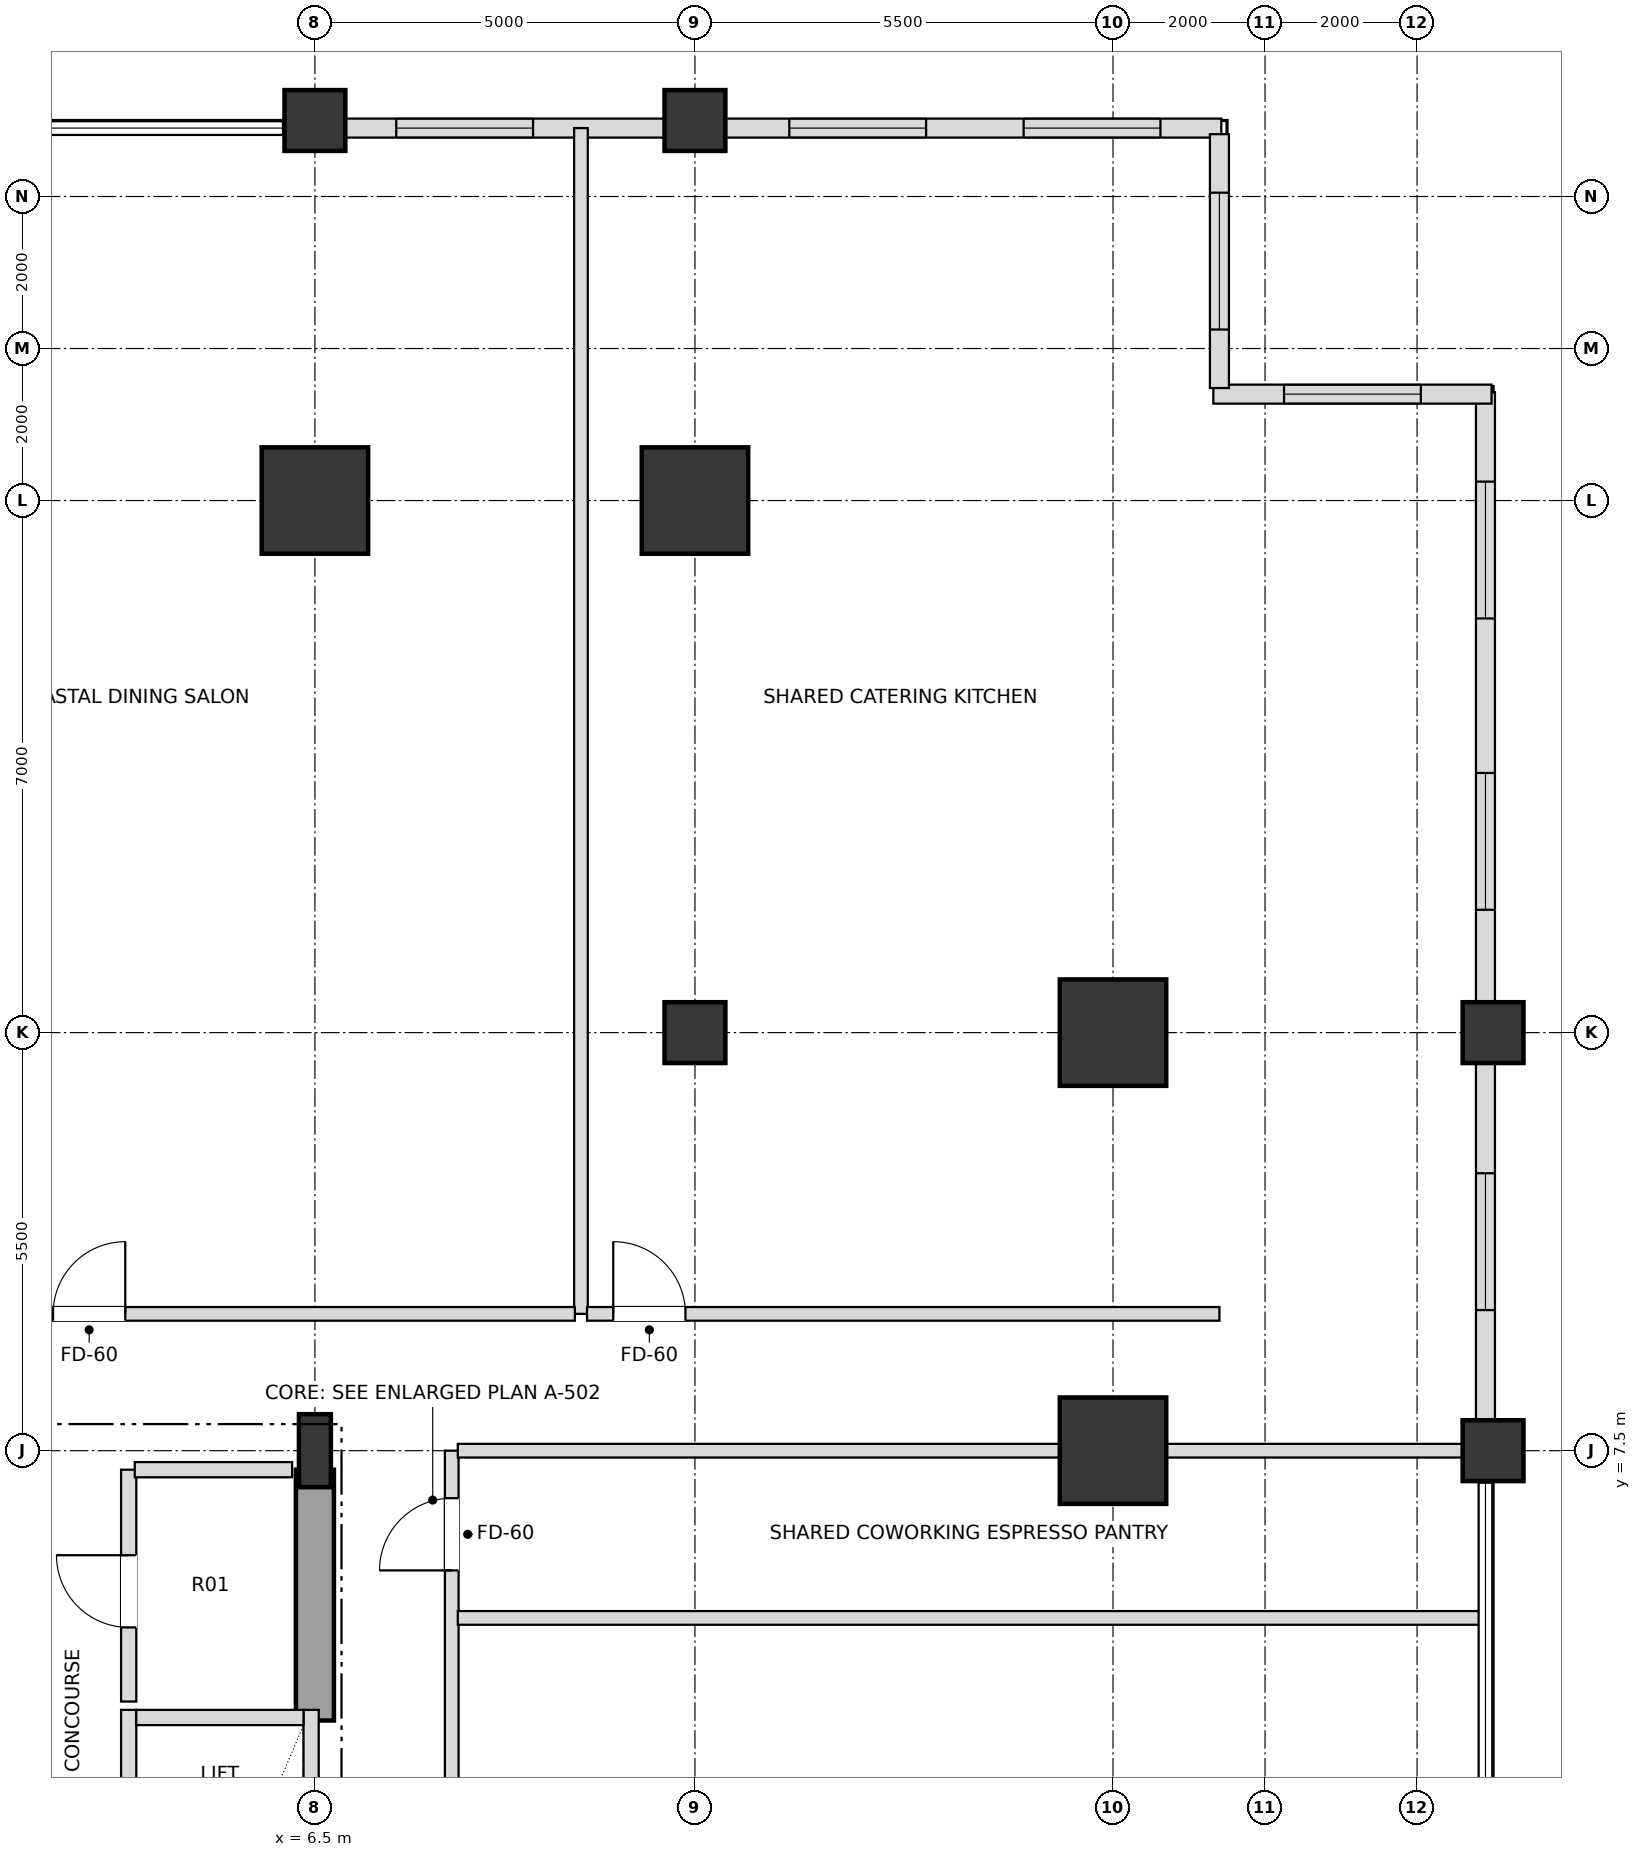
"""IFC4 building model, lengths in metres.
Left out: names, types, materials, properties, quantities, classifications, styles, units other than length and angle.
Written with IfcOpenShell. Run it as: python <this file> out.ifc"""

import sys

from ifc_helpers import new_model, si_unit, direction, frame, frame_2d, origin, origin_2d, place, context, subcontext, project, spatial, rectangle, i_section, extrude, element, fill, save


model = new_model("IFC4")
c1 = context("Model", 3, precision=1e-05, world=origin(), true_north=direction((0.0, 1.0)))
c2 = subcontext(c1, "Body", "Model", "MODEL_VIEW")
j1 = project(units=[si_unit("LENGTHUNIT", "METRE"), si_unit("PLANEANGLEUNIT", "RADIAN")], contexts=[c1])
p1 = place(None, origin())
s1 = spatial("IfcSite", under=j1, at=p1, CompositionType="ELEMENT")
p2 = place(p1, origin())
s2 = spatial("IfcBuilding", under=s1, at=p2, CompositionType="ELEMENT")
p3 = place(p2, frame((0.0, 0.0, 79.2)))
s3 = spatial("IfcBuildingStorey", under=s2, at=p3, CompositionType="ELEMENT", Elevation=79.2)
p4 = place(p3, frame((6.5, 7.5, 0.0), z_axis=(0.0, 0.0, 1.0), x_axis=(1.0, 0.0, 0.0)))
e1 = element("IfcColumn", 1, at=p4, inside=s3, PredefinedType="COLUMN", context=c2, shape_type="SweptSolid", body=[
    extrude(i_section(OverallWidth=0.42, OverallDepth=0.96, WebThickness=0.022, FlangeThickness=0.034, at=origin_2d()), origin(), (0.0, 0.0, 1.0), 3.6),
])
for number, where, z_axis, x_axis in (
    (2, (17.0, 7.5, 0.0), (0.0, 0.0, 1.0), (1.0, 0.0, 0.0)),
    (3, (17.0, 13.0, 0.0), (0.0, 0.0, 1.0), (1.0, 0.0, 0.0)),
    (4, (11.5, 20.0, 0.0), (0.0, 0.0, 1.0), (1.0, 0.0, 0.0)),
    (5, (6.5, 20.0, 0.0), (0.0, 0.0, 1.0), (1.0, 0.0, 0.0)),
):
    element("IfcColumn", number, at=place(p3, frame(where, z_axis=z_axis, x_axis=x_axis)), inside=s3, PredefinedType="USERDEFINED", context=c2, shape_type="SweptSolid", body=[
        extrude(rectangle(XDim=1.4, YDim=1.4, at=origin_2d()), origin(), (0.0, 0.0, 1.0), 3.6),
    ])
for number, where, z_axis, x_axis in (
    (6, (11.5, 13.0, 0.0), (0.0, 0.0, 1.0), (1.0, 0.0, 0.0)),
    (7, (6.5, 25.0, 0.0), (0.0, 0.0, 1.0), (1.0, 0.0, 0.0)),
    (8, (11.5, 25.0, 0.0), (0.0, 0.0, 1.0), (1.0, 0.0, 0.0)),
    (9, (22.0, 7.5, 0.0), (0.0, 0.0, 1.0), (1.0, 0.0, 0.0)),
    (10, (22.0, 13.0, 0.0), (0.0, 0.0, 1.0), (1.0, 0.0, 0.0)),
):
    element("IfcColumn", number, at=place(p3, frame(where, z_axis=z_axis, x_axis=x_axis)), inside=s3, PredefinedType="COLUMN", context=c2, shape_type="SweptSolid", body=[
        extrude(rectangle(XDim=0.8, YDim=0.8, at=origin_2d()), origin(), (0.0, 0.0, 1.0), 3.6),
    ])
p5 = place(p3, frame((18.425, 24.9, 0.0), z_axis=(0.0, 0.0, 1.0), x_axis=(-1.0, 0.0, 0.0)))
e11 = element("IfcWall", 11, at=p5, inside=s3, PredefinedType="SOLIDWALL", context=c2, shape_type="SweptSolid", body=[
    extrude(rectangle(XDim=6.53, YDim=0.25, at=frame_2d((3.265, 0.0))), origin(), (0.0, 0.0, 1.0), 2.736),
])
p6 = place(p5, frame((0.801, 0.0, 0.72)))
e12 = element("IfcOpeningElement", 12, at=p6, cuts=e11, PredefinedType="OPENING", context=c2, shape_type="SweptSolid", body=[
    extrude(rectangle(XDim=1.8, YDim=1.68, at=frame_2d((0.9, 0.84))), frame((0.0, 0.135, 0.0), z_axis=(0.0, -1.0, 0.0), x_axis=(1.0, 0.0, 0.0)), (0.0, 0.0, 1.0), 0.27),
])
p7 = place(p5, frame((3.884, 0.0, 0.72)))
e13 = element("IfcOpeningElement", 13, at=p7, cuts=e11, PredefinedType="OPENING", context=c2, shape_type="SweptSolid", body=[
    extrude(rectangle(XDim=1.8, YDim=1.68, at=frame_2d((0.9, 0.84))), frame((0.0, 0.135, 0.0), z_axis=(0.0, -1.0, 0.0), x_axis=(1.0, 0.0, 0.0)), (0.0, 0.0, 1.0), 0.27),
])
p8 = place(p3, frame((11.105, 24.9, 0.0), z_axis=(0.0, 0.0, 1.0), x_axis=(-1.0, 0.0, 0.0)))
e14 = element("IfcWall", 14, at=p8, inside=s3, PredefinedType="SOLIDWALL", context=c2, shape_type="SweptSolid", body=[
    extrude(rectangle(XDim=4.21, YDim=0.25, at=frame_2d((2.105, 0.0))), origin(), (0.0, 0.0, 1.0), 2.736),
])
p9 = place(p8, frame((1.735, 0.0, 0.72)))
e15 = element("IfcOpeningElement", 15, at=p9, cuts=e14, PredefinedType="OPENING", context=c2, shape_type="SweptSolid", body=[
    extrude(rectangle(XDim=1.8, YDim=1.68, at=frame_2d((0.9, 0.84))), frame((0.0, 0.135, 0.0), z_axis=(0.0, -1.0, 0.0), x_axis=(1.0, 0.0, 0.0)), (0.0, 0.0, 1.0), 0.27),
])
p10 = place(p3, frame((21.9, 7.895, 0.0), z_axis=(0.0, 0.0, 1.0), x_axis=(0.0, 1.0, 0.0)))
e16 = element("IfcWall", 16, at=p10, inside=s3, PredefinedType="SOLIDWALL", context=c2, shape_type="SweptSolid", body=[
    extrude(rectangle(XDim=4.71, YDim=0.25, at=frame_2d((2.355, 0.0))), origin(), (0.0, 0.0, 1.0), 2.736),
])
p11 = place(p10, frame((1.455, 0.0, 0.72)))
e17 = element("IfcOpeningElement", 17, at=p11, cuts=e16, PredefinedType="OPENING", context=c2, shape_type="SweptSolid", body=[
    extrude(rectangle(XDim=1.8, YDim=1.68, at=frame_2d((0.9, 0.84))), frame((0.0, 0.135, 0.0), z_axis=(0.0, -1.0, 0.0), x_axis=(1.0, 0.0, 0.0)), (0.0, 0.0, 1.0), 0.27),
])
p12 = place(p3, frame((21.9, 13.395, 0.0), z_axis=(0.0, 0.0, 1.0), x_axis=(0.0, 1.0, 0.0)))
e18 = element("IfcWall", 18, at=p12, inside=s3, PredefinedType="SOLIDWALL", context=c2, shape_type="SweptSolid", body=[
    extrude(rectangle(XDim=8.03, YDim=0.25, at=frame_2d((4.015, 0.0))), origin(), (0.0, 0.0, 1.0), 2.736),
])
p13 = place(p12, frame((1.221, 0.0, 0.72)))
e19 = element("IfcOpeningElement", 19, at=p13, cuts=e18, PredefinedType="OPENING", context=c2, shape_type="SweptSolid", body=[
    extrude(rectangle(XDim=1.8, YDim=1.68, at=frame_2d((0.9, 0.84))), frame((0.0, 0.135, 0.0), z_axis=(0.0, -1.0, 0.0), x_axis=(1.0, 0.0, 0.0)), (0.0, 0.0, 1.0), 0.27),
])
p14 = place(p12, frame((5.054, 0.0, 0.72)))
e20 = element("IfcOpeningElement", 20, at=p14, cuts=e18, PredefinedType="OPENING", context=c2, shape_type="SweptSolid", body=[
    extrude(rectangle(XDim=1.8, YDim=1.68, at=frame_2d((0.9, 0.84))), frame((0.0, 0.135, 0.0), z_axis=(0.0, -1.0, 0.0), x_axis=(1.0, 0.0, 0.0)), (0.0, 0.0, 1.0), 0.27),
])
p15 = place(p3, frame((21.98, 21.4, 0.0), z_axis=(0.0, 0.0, 1.0), x_axis=(-1.0, 0.0, 0.0)))
e21 = element("IfcWall", 21, at=p15, inside=s3, PredefinedType="SOLIDWALL", context=c2, shape_type="SweptSolid", body=[
    extrude(rectangle(XDim=3.66, YDim=0.25, at=frame_2d((1.83, 0.0))), origin(), (0.0, 0.0, 1.0), 2.736),
])
p16 = place(p15, frame((0.93, 0.0, 0.72)))
e22 = element("IfcOpeningElement", 22, at=p16, cuts=e21, PredefinedType="OPENING", context=c2, shape_type="SweptSolid", body=[
    extrude(rectangle(XDim=1.8, YDim=1.68, at=frame_2d((0.9, 0.84))), frame((0.0, 0.135, 0.0), z_axis=(0.0, -1.0, 0.0), x_axis=(1.0, 0.0, 0.0)), (0.0, 0.0, 1.0), 0.27),
])
p17 = place(p3, frame((18.4, 21.48, 0.0), z_axis=(0.0, 0.0, 1.0), x_axis=(0.0, 1.0, 0.0)))
e23 = element("IfcWall", 23, at=p17, inside=s3, PredefinedType="SOLIDWALL", context=c2, shape_type="SweptSolid", body=[
    extrude(rectangle(XDim=3.34, YDim=0.25, at=frame_2d((1.67, 0.0))), origin(), (0.0, 0.0, 1.0), 2.736),
])
p18 = place(p17, frame((0.77, 0.0, 0.72)))
e24 = element("IfcOpeningElement", 24, at=p18, cuts=e23, PredefinedType="OPENING", context=c2, shape_type="SweptSolid", body=[
    extrude(rectangle(XDim=1.8, YDim=1.68, at=frame_2d((0.9, 0.84))), frame((0.0, 0.135, 0.0), z_axis=(0.0, -1.0, 0.0), x_axis=(1.0, 0.0, 0.0)), (0.0, 0.0, 1.0), 0.27),
])
p19 = place(p3, frame((6.5, 3.95, 0.0), z_axis=(0.0, 0.0, 1.0), x_axis=(0.0, 1.0, 0.0)))
e25 = element("IfcWall", 25, at=p19, inside=s3, PredefinedType="SHEAR", context=c2, shape_type="SweptSolid", body=[
    extrude(rectangle(XDim=3.3, YDim=0.5, at=frame_2d((1.65, 0.0))), origin(), (0.0, 0.0, 1.0), 3.38),
])
p20 = place(p3, frame((4.05, -1.49, 0.0), z_axis=(0.0, 0.0, 1.0), x_axis=(0.0, 1.0, 0.0)))
e26 = element("IfcWall", 26, at=p20, inside=s3, PredefinedType="SOLIDWALL", context=c2, shape_type="SweptSolid", body=[
    extrude(rectangle(XDim=5.58, YDim=0.2, at=frame_2d((2.79, 0.0))), origin(), (0.0, 0.0, 1.0), 3.38),
])
p21 = place(p3, frame((6.45, -1.49, 0.0), z_axis=(0.0, 0.0, 1.0), x_axis=(0.0, 1.0, 0.0)))
e27 = element("IfcWall", 27, at=p21, inside=s3, PredefinedType="SOLIDWALL", context=c2, shape_type="SweptSolid", body=[
    extrude(rectangle(XDim=5.58, YDim=0.2, at=frame_2d((2.79, 0.0))), origin(), (0.0, 0.0, 1.0), 2.816),
])
p22 = place(p3, frame((4.15, 3.99, 0.0), z_axis=(0.0, 0.0, 1.0), x_axis=(1.0, 0.0, 0.0)))
e28 = element("IfcWall", 28, at=p22, inside=s3, PredefinedType="SOLIDWALL", context=c2, shape_type="SweptSolid", body=[
    extrude(rectangle(XDim=2.2, YDim=0.2, at=frame_2d((1.1, 0.0))), origin(), (0.0, 0.0, 1.0), 3.38),
])
p23 = place(p3, frame((4.05, 4.2, 0.0), z_axis=(0.0, 0.0, 1.0), x_axis=(0.0, 1.0, 0.0)))
e29 = element("IfcWall", 29, at=p23, inside=s3, PredefinedType="SOLIDWALL", context=c2, shape_type="SweptSolid", body=[
    extrude(rectangle(XDim=3.05, YDim=0.2, at=frame_2d((1.525, 0.0))), origin(), (0.0, 0.0, 1.0), 3.38),
])
p24 = place(p23, frame((0.975, 0.0, 0.0)))
e30 = element("IfcOpeningElement", 30, at=p24, cuts=e29, PredefinedType="OPENING", context=c2, shape_type="SweptSolid", body=[
    extrude(rectangle(XDim=0.95, YDim=2.15, at=frame_2d((0.475, 1.075))), frame((0.0, 0.11, 0.0), z_axis=(0.0, -1.0, 0.0), x_axis=(1.0, 0.0, 0.0)), (0.0, 0.0, 1.0), 0.22),
])
p25 = place(p3, frame((8.3, -7.5, 0.0), z_axis=(0.0, 0.0, 1.0), x_axis=(0.0, 1.0, 0.0)))
e31 = element("IfcWall", 31, at=p25, inside=s3, PredefinedType="PARTITIONING", context=c2, shape_type="SweptSolid", body=[
    extrude(rectangle(XDim=15.0, YDim=0.18, at=frame_2d((7.5, 0.0))), origin(), (0.0, 0.0, 1.0), 3.38),
])
p26 = place(p25, frame((2.075, 0.0, 0.0)))
e32 = element("IfcOpeningElement", 32, at=p26, cuts=e31, PredefinedType="OPENING", context=c2, shape_type="SweptSolid", body=[
    extrude(rectangle(XDim=0.95, YDim=2.15, at=frame_2d((0.475, 1.075))), frame((0.0, 0.1, 0.0), z_axis=(0.0, -1.0, 0.0), x_axis=(1.0, 0.0, 0.0)), (0.0, 0.0, 1.0), 0.2),
])
p27 = place(p25, frame((8.475, 0.0, 0.0)))
e33 = element("IfcOpeningElement", 33, at=p27, cuts=e31, PredefinedType="OPENING", context=c2, shape_type="SweptSolid", body=[
    extrude(rectangle(XDim=0.95, YDim=2.15, at=frame_2d((0.475, 1.075))), frame((0.0, 0.1, 0.0), z_axis=(0.0, -1.0, 0.0), x_axis=(1.0, 0.0, 0.0)), (0.0, 0.0, 1.0), 0.2),
])
p28 = place(p25, frame((13.425, 0.0, 0.0)))
e34 = element("IfcOpeningElement", 34, at=p28, cuts=e31, PredefinedType="OPENING", context=c2, shape_type="SweptSolid", body=[
    extrude(rectangle(XDim=0.95, YDim=2.15, at=frame_2d((0.475, 1.075))), frame((0.0, 0.1, 0.0), z_axis=(0.0, -1.0, 0.0), x_axis=(1.0, 0.0, 0.0)), (0.0, 0.0, 1.0), 0.2),
])
p29 = place(p3, frame((10.0, 9.3, 0.0), z_axis=(0.0, 0.0, 1.0), x_axis=(0.0, 1.0, 0.0)))
e35 = element("IfcWall", 35, at=p29, inside=s3, PredefinedType="PARTITIONING", context=c2, shape_type="SweptSolid", body=[
    extrude(rectangle(XDim=15.6, YDim=0.18, at=frame_2d((7.8, 0.0))), origin(), (0.0, 0.0, 1.0), 2.816),
])
p30 = place(p3, frame((8.38, 5.3, 0.0), z_axis=(0.0, 0.0, 1.0), x_axis=(1.0, 0.0, 0.0)))
e36 = element("IfcWall", 36, at=p30, inside=s3, PredefinedType="PARTITIONING", context=c2, shape_type="SweptSolid", body=[
    extrude(rectangle(XDim=13.44, YDim=0.18, at=frame_2d((6.72, 0.0))), origin(), (0.0, 0.0, 1.0), 2.816),
])
p31 = place(p3, frame((4.13, 7.25, 0.0), z_axis=(0.0, 0.0, 1.0), x_axis=(1.0, 0.0, 0.0)))
e37 = element("IfcWall", 37, at=p31, inside=s3, PredefinedType="SOLIDWALL", context=c2, shape_type="SweptSolid", body=[
    extrude(rectangle(XDim=2.07, YDim=0.2, at=frame_2d((1.035, 0.0))), origin(), (0.0, 0.0, 1.0), 3.38),
])
p32 = place(p3, frame((8.38, 7.5, 0.0), z_axis=(0.0, 0.0, 1.0), x_axis=(1.0, 0.0, 0.0)))
e38 = element("IfcWall", 38, at=p32, inside=s3, PredefinedType="PARTITIONING", context=c2, shape_type="SweptSolid", body=[
    extrude(rectangle(XDim=13.52, YDim=0.18, at=frame_2d((6.76, 0.0))), origin(), (0.0, 0.0, 1.0), 2.816),
])
p33 = place(p3, frame((-2.87, 9.3, 0.0), z_axis=(0.0, 0.0, 1.0), x_axis=(1.0, 0.0, 0.0)))
e39 = element("IfcWall", 39, at=p33, inside=s3, PredefinedType="PARTITIONING", context=c2, shape_type="SweptSolid", body=[
    extrude(rectangle(XDim=12.79, YDim=0.18, at=frame_2d((6.395, 0.0))), origin(), (0.0, 0.0, 1.0), 2.816),
])
p34 = place(p33, frame((5.925, 0.0, 0.0)))
e40 = element("IfcOpeningElement", 40, at=p34, cuts=e39, PredefinedType="OPENING", context=c2, shape_type="SweptSolid", body=[
    extrude(rectangle(XDim=0.95, YDim=2.15, at=frame_2d((0.475, 1.075))), frame((0.0, 0.1, 0.0), z_axis=(0.0, -1.0, 0.0), x_axis=(1.0, 0.0, 0.0)), (0.0, 0.0, 1.0), 0.2),
])
p35 = place(p3, frame((10.08, 9.3, 0.0), z_axis=(0.0, 0.0, 1.0), x_axis=(1.0, 0.0, 0.0)))
e41 = element("IfcWall", 41, at=p35, inside=s3, PredefinedType="PARTITIONING", context=c2, shape_type="SweptSolid", body=[
    extrude(rectangle(XDim=8.32, YDim=0.18, at=frame_2d((4.16, 0.0))), origin(), (0.0, 0.0, 1.0), 2.816),
])
p36 = place(p35, frame((0.345, 0.0, 0.0)))
e42 = element("IfcOpeningElement", 42, at=p36, cuts=e41, PredefinedType="OPENING", context=c2, shape_type="SweptSolid", body=[
    extrude(rectangle(XDim=0.95, YDim=2.15, at=frame_2d((0.475, 1.075))), frame((0.0, 0.1, 0.0), z_axis=(0.0, -1.0, 0.0), x_axis=(1.0, 0.0, 0.0)), (0.0, 0.0, 1.0), 0.2),
])
p37 = place(p6, origin())
e43 = element("IfcWindow", 43, at=p37, inside=s3, PartitioningType="SINGLE_PANEL", PredefinedType="WINDOW", context=c2, shape_type="SweptSolid", body=[
    extrude(rectangle(XDim=1.8, YDim=1.68, at=frame_2d((0.9, 0.84))), frame((0.0, 0.03, 0.0), z_axis=(0.0, -1.0, 0.0), x_axis=(1.0, 0.0, 0.0)), (0.0, 0.0, 1.0), 0.06),
])
fill(e12, e43)
p38 = place(p7, origin())
e44 = element("IfcWindow", 44, at=p38, inside=s3, PartitioningType="SINGLE_PANEL", PredefinedType="WINDOW", context=c2, shape_type="SweptSolid", body=[
    extrude(rectangle(XDim=1.8, YDim=1.68, at=frame_2d((0.9, 0.84))), frame((0.0, 0.03, 0.0), z_axis=(0.0, -1.0, 0.0), x_axis=(1.0, 0.0, 0.0)), (0.0, 0.0, 1.0), 0.06),
])
fill(e13, e44)
p39 = place(p9, origin())
e45 = element("IfcWindow", 45, at=p39, inside=s3, PartitioningType="SINGLE_PANEL", PredefinedType="WINDOW", context=c2, shape_type="SweptSolid", body=[
    extrude(rectangle(XDim=1.8, YDim=1.68, at=frame_2d((0.9, 0.84))), frame((0.0, 0.03, 0.0), z_axis=(0.0, -1.0, 0.0), x_axis=(1.0, 0.0, 0.0)), (0.0, 0.0, 1.0), 0.06),
])
fill(e15, e45)
p40 = place(p11, origin())
e46 = element("IfcWindow", 46, at=p40, inside=s3, PartitioningType="SINGLE_PANEL", PredefinedType="WINDOW", context=c2, shape_type="SweptSolid", body=[
    extrude(rectangle(XDim=1.8, YDim=1.68, at=frame_2d((0.9, 0.84))), frame((0.0, 0.03, 0.0), z_axis=(0.0, -1.0, 0.0), x_axis=(1.0, 0.0, 0.0)), (0.0, 0.0, 1.0), 0.06),
])
fill(e17, e46)
p41 = place(p13, origin())
e47 = element("IfcWindow", 47, at=p41, inside=s3, PartitioningType="SINGLE_PANEL", PredefinedType="WINDOW", context=c2, shape_type="SweptSolid", body=[
    extrude(rectangle(XDim=1.8, YDim=1.68, at=frame_2d((0.9, 0.84))), frame((0.0, 0.03, 0.0), z_axis=(0.0, -1.0, 0.0), x_axis=(1.0, 0.0, 0.0)), (0.0, 0.0, 1.0), 0.06),
])
fill(e19, e47)
p42 = place(p14, origin())
e48 = element("IfcWindow", 48, at=p42, inside=s3, PartitioningType="SINGLE_PANEL", PredefinedType="WINDOW", context=c2, shape_type="SweptSolid", body=[
    extrude(rectangle(XDim=1.8, YDim=1.68, at=frame_2d((0.9, 0.84))), frame((0.0, 0.03, 0.0), z_axis=(0.0, -1.0, 0.0), x_axis=(1.0, 0.0, 0.0)), (0.0, 0.0, 1.0), 0.06),
])
fill(e20, e48)
p43 = place(p16, origin())
e49 = element("IfcWindow", 49, at=p43, inside=s3, PartitioningType="SINGLE_PANEL", PredefinedType="WINDOW", context=c2, shape_type="SweptSolid", body=[
    extrude(rectangle(XDim=1.8, YDim=1.68, at=frame_2d((0.9, 0.84))), frame((0.0, 0.03, 0.0), z_axis=(0.0, -1.0, 0.0), x_axis=(1.0, 0.0, 0.0)), (0.0, 0.0, 1.0), 0.06),
])
fill(e22, e49)
p44 = place(p18, origin())
e50 = element("IfcWindow", 50, at=p44, inside=s3, PartitioningType="SINGLE_PANEL", PredefinedType="WINDOW", context=c2, shape_type="SweptSolid", body=[
    extrude(rectangle(XDim=1.8, YDim=1.68, at=frame_2d((0.9, 0.84))), frame((0.0, 0.03, 0.0), z_axis=(0.0, -1.0, 0.0), x_axis=(1.0, 0.0, 0.0)), (0.0, 0.0, 1.0), 0.06),
])
fill(e24, e50)
p45 = place(p24, origin())
e51 = element("IfcDoor", 51, at=p45, inside=s3, OperationType="SINGLE_SWING_RIGHT", PredefinedType="DOOR", context=c2, shape_type="SweptSolid", body=[
    extrude(rectangle(XDim=0.95, YDim=2.15, at=frame_2d((0.475, 1.075))), frame((0.0, 0.025, 0.0), z_axis=(0.0, -1.0, 0.0), x_axis=(1.0, 0.0, 0.0)), (0.0, 0.0, 1.0), 0.05),
])
fill(e30, e51)
p46 = place(p34, origin())
e52 = element("IfcDoor", 52, at=p46, inside=s3, OperationType="SINGLE_SWING_RIGHT", PredefinedType="DOOR", context=c2, shape_type="SweptSolid", body=[
    extrude(rectangle(XDim=0.95, YDim=2.15, at=frame_2d((0.475, 1.075))), frame((0.0, 0.025, 0.0), z_axis=(0.0, -1.0, 0.0), x_axis=(1.0, 0.0, 0.0)), (0.0, 0.0, 1.0), 0.05),
])
fill(e40, e52)
p47 = place(p36, origin())
e53 = element("IfcDoor", 53, at=p47, inside=s3, OperationType="SINGLE_SWING_LEFT", PredefinedType="DOOR", context=c2, shape_type="SweptSolid", body=[
    extrude(rectangle(XDim=0.95, YDim=2.15, at=frame_2d((0.475, 1.075))), frame((0.0, 0.025, 0.0), z_axis=(0.0, -1.0, 0.0), x_axis=(1.0, 0.0, 0.0)), (0.0, 0.0, 1.0), 0.05),
])
fill(e42, e53)
p48 = place(p28, origin())
e54 = element("IfcDoor", 54, at=p48, inside=s3, OperationType="SINGLE_SWING_LEFT", PredefinedType="DOOR", context=c2, shape_type="SweptSolid", body=[
    extrude(rectangle(XDim=0.95, YDim=2.15, at=frame_2d((0.475, 1.075))), frame((0.0, 0.025, 0.0), z_axis=(0.0, -1.0, 0.0), x_axis=(1.0, 0.0, 0.0)), (0.0, 0.0, 1.0), 0.05),
])
fill(e34, e54)
save(model, sys.argv[1])
